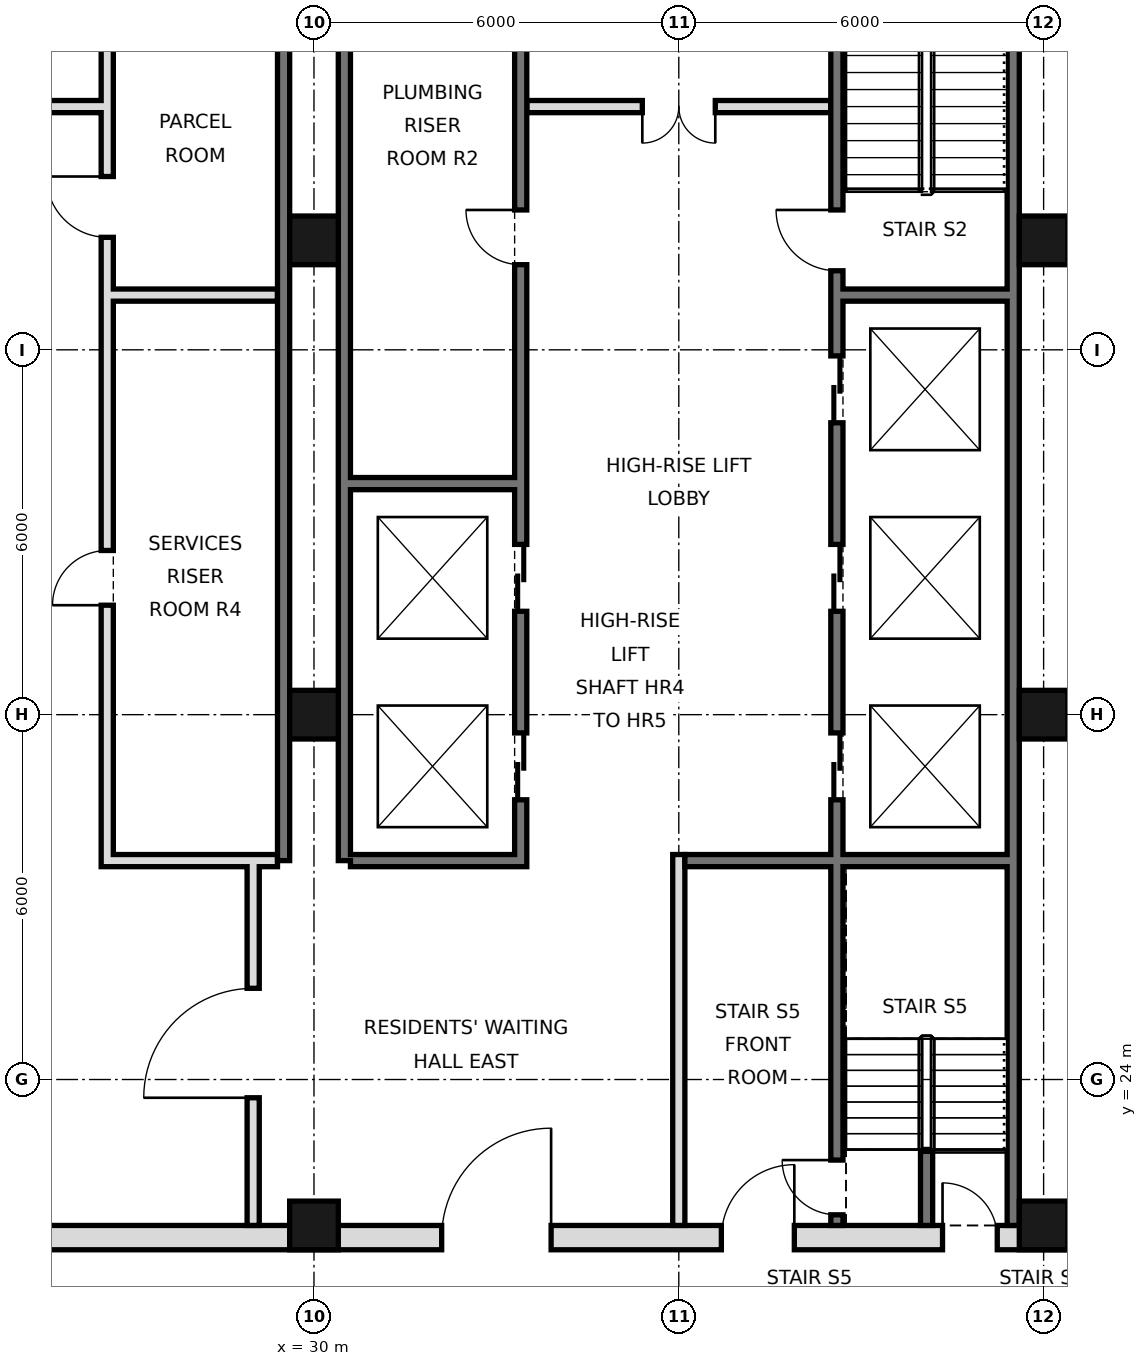
"""IFC4 building model, lengths in metres.
Left out: names, types, materials, properties, quantities, classifications, styles, units other than length and angle.
Written with IfcOpenShell. Run it as: python <this file> out.ifc"""

import sys

from ifc_helpers import new_model, si_unit, direction, frame, frame_2d, origin, origin_2d, place, context, subcontext, project, spatial, rectangle, hollow_rectangle, extrude, element, fill, save


model = new_model("IFC4")
c1 = context("Model", 3, precision=1e-05, world=origin(), true_north=direction((0.0, 1.0)))
c2 = subcontext(c1, "Body", "Model", "MODEL_VIEW")
j1 = project(units=[si_unit("LENGTHUNIT", "METRE"), si_unit("PLANEANGLEUNIT", "RADIAN")], contexts=[c1])
p1 = place(None, origin())
s1 = spatial("IfcSite", under=j1, at=p1, CompositionType="ELEMENT")
p2 = place(p1, origin())
s2 = spatial("IfcBuilding", under=s1, at=p2, CompositionType="ELEMENT")
p3 = place(p2, frame((0.0, 0.0, 234.2)))
s3 = spatial("IfcBuildingStorey", under=s2, at=p3, CompositionType="ELEMENT", Elevation=234.2)
for number, where, z_axis, x_axis in (
    (1, (30.0, 21.6, 0.0), (0.0, 0.0, 1.0), (1.0, 0.0, 0.0)),
    (2, (30.0, 30.0, 0.0), (0.0, 0.0, 1.0), (1.0, 0.0, 0.0)),
    (3, (30.0, 37.8, 0.0), (0.0, 0.0, 1.0), (1.0, 0.0, 0.0)),
    (4, (42.0, 21.6, 0.0), (0.0, 0.0, 1.0), (1.0, 0.0, 0.0)),
    (5, (42.0, 30.0, 0.0), (0.0, 0.0, 1.0), (1.0, 0.0, 0.0)),
    (6, (42.0, 37.8, 0.0), (0.0, 0.0, 1.0), (1.0, 0.0, 0.0)),
):
    element("IfcColumn", number, at=place(p3, frame(where, z_axis=z_axis, x_axis=x_axis)), inside=s3, PredefinedType="COLUMN", context=c2, shape_type="SweptSolid", body=[
        extrude(hollow_rectangle(XDim=0.8, YDim=0.8, WallThickness=0.04, at=origin_2d()), origin(), (0.0, 0.0, 1.0), 5.4),
    ])
p4 = place(p3, frame((41.5, 21.6, 0.0), z_axis=(0.0, 0.0, 1.0), x_axis=(0.0, 1.0, 0.0)))
e7 = element("IfcWall", 7, at=p4, inside=s3, PredefinedType="SOLIDWALL", context=c2, shape_type="SweptSolid", body=[
    extrude(rectangle(XDim=23.5, YDim=0.2, at=frame_2d((11.75, 0.0))), origin(), (0.0, 0.0, 1.0), 5.22),
])
for number, where, z_axis, x_axis in (
    (8, (29.5, 27.6, 0.0), (0.0, 0.0, 1.0), (0.0, 1.0, 0.0)),
    (9, (30.5, 27.6, 0.0), (0.0, 0.0, 1.0), (0.0, 1.0, 0.0)),
):
    element("IfcWall", number, at=place(p3, frame(where, z_axis=z_axis, x_axis=x_axis)), inside=s3, PredefinedType="SOLIDWALL", context=c2, shape_type="SweptSolid", body=[
        extrude(rectangle(XDim=17.5, YDim=0.2, at=frame_2d((8.75, 0.0))), origin(), (0.0, 0.0, 1.0), 5.22),
    ])
p5 = place(p3, frame((5.6, 21.4, 0.0), z_axis=(0.0, 0.0, 1.0), x_axis=(1.0, 0.0, 0.0)))
e10 = element("IfcWall", 10, at=p5, inside=s3, PredefinedType="SOLIDWALL", context=c2, shape_type="SweptSolid", body=[
    extrude(rectangle(XDim=36.8, YDim=0.4, at=frame_2d((18.4, 0.0))), origin(), (0.0, 0.0, 1.0), 5.22),
])
p6 = place(p5, frame((8.5, 0.0, 0.0)))
e11 = element("IfcOpeningElement", 11, at=p6, cuts=e10, PredefinedType="OPENING", context=c2, shape_type="SweptSolid", body=[
    extrude(rectangle(XDim=1.8, YDim=2.1, at=frame_2d((0.9, 1.05))), frame((0.0, 0.21, 0.0), z_axis=(0.0, -1.0, 0.0), x_axis=(1.0, 0.0, 0.0)), (0.0, 0.0, 1.0), 0.42),
])
p7 = place(p5, frame((17.5, 0.0, 0.0)))
e12 = element("IfcOpeningElement", 12, at=p7, cuts=e10, PredefinedType="OPENING", context=c2, shape_type="SweptSolid", body=[
    extrude(rectangle(XDim=1.8, YDim=2.1, at=frame_2d((0.9, 1.05))), frame((0.0, 0.21, 0.0), z_axis=(0.0, -1.0, 0.0), x_axis=(1.0, 0.0, 0.0)), (0.0, 0.0, 1.0), 0.42),
])
p8 = place(p5, frame((26.5, 0.0, 0.0)))
e13 = element("IfcOpeningElement", 13, at=p8, cuts=e10, PredefinedType="OPENING", context=c2, shape_type="SweptSolid", body=[
    extrude(rectangle(XDim=1.8, YDim=2.1, at=frame_2d((0.9, 1.05))), frame((0.0, 0.21, 0.0), z_axis=(0.0, -1.0, 0.0), x_axis=(1.0, 0.0, 0.0)), (0.0, 0.0, 1.0), 0.42),
])
p9 = place(p5, frame((4.5, 0.0, 0.0)))
e14 = element("IfcOpeningElement", 14, at=p9, cuts=e10, PredefinedType="OPENING", context=c2, shape_type="SweptSolid", body=[
    extrude(rectangle(XDim=1.2, YDim=2.1, at=frame_2d((0.6, 1.05))), frame((0.0, 0.21, 0.0), z_axis=(0.0, -1.0, 0.0), x_axis=(1.0, 0.0, 0.0)), (0.0, 0.0, 1.0), 0.42),
])
p10 = place(p5, frame((31.1, 0.0, 0.0)))
e15 = element("IfcOpeningElement", 15, at=p10, cuts=e10, PredefinedType="OPENING", context=c2, shape_type="SweptSolid", body=[
    extrude(rectangle(XDim=1.2, YDim=2.1, at=frame_2d((0.6, 1.05))), frame((0.0, 0.21, 0.0), z_axis=(0.0, -1.0, 0.0), x_axis=(1.0, 0.0, 0.0)), (0.0, 0.0, 1.0), 0.42),
])
p11 = place(p5, frame((1.163, 0.0, 0.0)))
e16 = element("IfcOpeningElement", 16, at=p11, cuts=e10, PredefinedType="OPENING", context=c2, shape_type="SweptSolid", body=[
    extrude(rectangle(XDim=0.9, YDim=2.1, at=frame_2d((0.45, 1.05))), frame((0.0, 0.21, 0.0), z_axis=(0.0, -1.0, 0.0), x_axis=(1.0, 0.0, 0.0)), (0.0, 0.0, 1.0), 0.42),
])
p12 = place(p5, frame((34.738, 0.0, 0.0)))
e17 = element("IfcOpeningElement", 17, at=p12, cuts=e10, PredefinedType="OPENING", context=c2, shape_type="SweptSolid", body=[
    extrude(rectangle(XDim=0.9, YDim=2.1, at=frame_2d((0.45, 1.05))), frame((0.0, 0.21, 0.0), z_axis=(0.0, -1.0, 0.0), x_axis=(1.0, 0.0, 0.0)), (0.0, 0.0, 1.0), 0.42),
])
p13 = place(p3, frame((29.0, 21.6, 0.0), z_axis=(0.0, 0.0, 1.0), x_axis=(0.0, 1.0, 0.0)))
e18 = element("IfcWall", 18, at=p13, inside=s3, PredefinedType="PARTITIONING", context=c2, shape_type="SweptSolid", body=[
    extrude(rectangle(XDim=6.0, YDim=0.2, at=frame_2d((3.0, 0.0))), origin(), (0.0, 0.0, 1.0), 5.22),
])
p14 = place(p13, frame((2.1, 0.0, 0.0)))
e19 = element("IfcOpeningElement", 19, at=p14, cuts=e18, PredefinedType="OPENING", context=c2, shape_type="SweptSolid", body=[
    extrude(rectangle(XDim=1.8, YDim=2.1, at=frame_2d((0.9, 1.05))), frame((0.0, 0.11, 0.0), z_axis=(0.0, -1.0, 0.0), x_axis=(1.0, 0.0, 0.0)), (0.0, 0.0, 1.0), 0.22),
])
p15 = place(p3, frame((26.6, 27.5, 0.0), z_axis=(0.0, 0.0, 1.0), x_axis=(0.0, 1.0, 0.0)))
e20 = element("IfcWall", 20, at=p15, inside=s3, PredefinedType="SOLIDWALL", context=c2, shape_type="SweptSolid", body=[
    extrude(rectangle(XDim=17.5, YDim=0.2, at=frame_2d((8.75, 0.0))), origin(), (0.0, 0.0, 1.0), 5.22),
])
p16 = place(p15, frame((4.3, 0.0, 0.0)))
e21 = element("IfcOpeningElement", 21, at=p16, cuts=e20, PredefinedType="OPENING", context=c2, shape_type="SweptSolid", body=[
    extrude(rectangle(XDim=0.9, YDim=2.1, at=frame_2d((0.45, 1.05))), frame((0.0, 0.11, 0.0), z_axis=(0.0, -1.0, 0.0), x_axis=(1.0, 0.0, 0.0)), (0.0, 0.0, 1.0), 0.22),
])
p17 = place(p15, frame((10.35, 0.0, 0.0)))
e22 = element("IfcOpeningElement", 22, at=p17, cuts=e20, PredefinedType="OPENING", context=c2, shape_type="SweptSolid", body=[
    extrude(rectangle(XDim=1.0, YDim=2.1, at=frame_2d((0.5, 1.05))), frame((0.0, 0.11, 0.0), z_axis=(0.0, -1.0, 0.0), x_axis=(1.0, 0.0, 0.0)), (0.0, 0.0, 1.0), 0.22),
])
p18 = place(p15, frame((15.475, 0.0, 0.0)))
e23 = element("IfcOpeningElement", 23, at=p18, cuts=e20, PredefinedType="OPENING", context=c2, shape_type="SweptSolid", body=[
    extrude(rectangle(XDim=1.0, YDim=2.1, at=frame_2d((0.5, 1.05))), frame((0.0, 0.11, 0.0), z_axis=(0.0, -1.0, 0.0), x_axis=(1.0, 0.0, 0.0)), (0.0, 0.0, 1.0), 0.22),
])
p19 = place(p3, frame((33.4, 27.5, 0.0), z_axis=(0.0, 0.0, 1.0), x_axis=(0.0, 1.0, 0.0)))
e24 = element("IfcWall", 24, at=p19, inside=s3, PredefinedType="SOLIDWALL", context=c2, shape_type="SweptSolid", body=[
    extrude(rectangle(XDim=17.5, YDim=0.2, at=frame_2d((8.75, 0.0))), origin(), (0.0, 0.0, 1.0), 5.22),
])
p20 = place(p19, frame((1.1, 0.0, 0.0)))
e25 = element("IfcOpeningElement", 25, at=p20, cuts=e24, PredefinedType="OPENING", context=c2, shape_type="SweptSolid", body=[
    extrude(rectangle(XDim=1.1, YDim=2.1, at=frame_2d((0.55, 1.05))), frame((0.0, 0.11, 0.0), z_axis=(0.0, -1.0, 0.0), x_axis=(1.0, 0.0, 0.0)), (0.0, 0.0, 1.0), 0.22),
])
p21 = place(p19, frame((4.2, 0.0, 0.0)))
e26 = element("IfcOpeningElement", 26, at=p21, cuts=e24, PredefinedType="OPENING", context=c2, shape_type="SweptSolid", body=[
    extrude(rectangle(XDim=1.1, YDim=2.1, at=frame_2d((0.55, 1.05))), frame((0.0, 0.11, 0.0), z_axis=(0.0, -1.0, 0.0), x_axis=(1.0, 0.0, 0.0)), (0.0, 0.0, 1.0), 0.22),
])
p22 = place(p19, frame((15.4, 0.0, 0.0)))
e27 = element("IfcOpeningElement", 27, at=p22, cuts=e24, PredefinedType="OPENING", context=c2, shape_type="SweptSolid", body=[
    extrude(rectangle(XDim=1.1, YDim=2.1, at=frame_2d((0.55, 1.05))), frame((0.0, 0.11, 0.0), z_axis=(0.0, -1.0, 0.0), x_axis=(1.0, 0.0, 0.0)), (0.0, 0.0, 1.0), 0.22),
])
p23 = place(p19, frame((9.9, 0.0, 0.0)))
e28 = element("IfcOpeningElement", 28, at=p23, cuts=e24, PredefinedType="OPENING", context=c2, shape_type="SweptSolid", body=[
    extrude(rectangle(XDim=0.9, YDim=2.1, at=frame_2d((0.45, 1.05))), frame((0.0, 0.11, 0.0), z_axis=(0.0, -1.0, 0.0), x_axis=(1.0, 0.0, 0.0)), (0.0, 0.0, 1.0), 0.22),
])
p24 = place(p3, frame((36.0, 21.6, 0.0), z_axis=(0.0, 0.0, 1.0), x_axis=(0.0, 1.0, 0.0)))
e29 = element("IfcWall", 29, at=p24, inside=s3, PredefinedType="PARTITIONING", context=c2, shape_type="SweptSolid", body=[
    extrude(rectangle(XDim=6.1, YDim=0.2, at=frame_2d((3.05, 0.0))), origin(), (0.0, 0.0, 1.0), 5.22),
])
p25 = place(p3, frame((38.6, 21.6, 0.0), z_axis=(0.0, 0.0, 1.0), x_axis=(0.0, 1.0, 0.0)))
e30 = element("IfcWall", 30, at=p25, inside=s3, PredefinedType="SOLIDWALL", context=c2, shape_type="SweptSolid", body=[
    extrude(rectangle(XDim=23.4, YDim=0.2, at=frame_2d((11.7, 0.0))), origin(), (0.0, 0.0, 1.0), 5.22),
])
p26 = place(p25, frame((7.0, 0.0, 0.0)))
e31 = element("IfcOpeningElement", 31, at=p26, cuts=e30, PredefinedType="OPENING", context=c2, shape_type="SweptSolid", body=[
    extrude(rectangle(XDim=1.1, YDim=2.1, at=frame_2d((0.55, 1.05))), frame((0.0, 0.11, 0.0), z_axis=(0.0, -1.0, 0.0), x_axis=(1.0, 0.0, 0.0)), (0.0, 0.0, 1.0), 0.22),
])
p27 = place(p25, frame((10.1, 0.0, 0.0)))
e32 = element("IfcOpeningElement", 32, at=p27, cuts=e30, PredefinedType="OPENING", context=c2, shape_type="SweptSolid", body=[
    extrude(rectangle(XDim=1.1, YDim=2.1, at=frame_2d((0.55, 1.05))), frame((0.0, 0.11, 0.0), z_axis=(0.0, -1.0, 0.0), x_axis=(1.0, 0.0, 0.0)), (0.0, 0.0, 1.0), 0.22),
])
p28 = place(p25, frame((13.2, 0.0, 0.0)))
e33 = element("IfcOpeningElement", 33, at=p28, cuts=e30, PredefinedType="OPENING", context=c2, shape_type="SweptSolid", body=[
    extrude(rectangle(XDim=1.1, YDim=2.1, at=frame_2d((0.55, 1.05))), frame((0.0, 0.11, 0.0), z_axis=(0.0, -1.0, 0.0), x_axis=(1.0, 0.0, 0.0)), (0.0, 0.0, 1.0), 0.22),
])
p29 = place(p25, frame((22.1, 0.0, 0.0)))
e34 = element("IfcOpeningElement", 34, at=p29, cuts=e30, PredefinedType="OPENING", context=c2, shape_type="SweptSolid", body=[
    extrude(rectangle(XDim=1.0, YDim=2.1, at=frame_2d((0.5, 1.05))), frame((0.0, 0.11, 0.0), z_axis=(0.0, -1.0, 0.0), x_axis=(1.0, 0.0, 0.0)), (0.0, 0.0, 1.0), 0.22),
])
p30 = place(p25, frame((15.7, 0.0, 0.0)))
e35 = element("IfcOpeningElement", 35, at=p30, cuts=e30, PredefinedType="OPENING", context=c2, shape_type="SweptSolid", body=[
    extrude(rectangle(XDim=1.0, YDim=2.1, at=frame_2d((0.5, 1.05))), frame((0.0, 0.11, 0.0), z_axis=(0.0, -1.0, 0.0), x_axis=(1.0, 0.0, 0.0)), (0.0, 0.0, 1.0), 0.22),
])
p31 = place(p25, frame((0.175, 0.0, 0.0)))
e36 = element("IfcOpeningElement", 36, at=p31, cuts=e30, PredefinedType="OPENING", context=c2, shape_type="SweptSolid", body=[
    extrude(rectangle(XDim=0.9, YDim=2.1, at=frame_2d((0.45, 1.05))), frame((0.0, 0.11, 0.0), z_axis=(0.0, -1.0, 0.0), x_axis=(1.0, 0.0, 0.0)), (0.0, 0.0, 1.0), 0.22),
])
p32 = place(p3, frame((40.075, 21.6, 0.0), z_axis=(0.0, 0.0, 1.0), x_axis=(0.0, 1.0, 0.0)))
e37 = element("IfcWall", 37, at=p32, inside=s3, PredefinedType="SOLIDWALL", context=c2, shape_type="SweptSolid", body=[
    extrude(rectangle(XDim=1.25, YDim=0.2, at=frame_2d((0.625, 0.0))), origin(), (0.0, 0.0, 1.0), 5.22),
])
for number, where, z_axis, x_axis in (
    (38, (26.7, 27.6, 0.0), (0.0, 0.0, 1.0), (1.0, 0.0, 0.0)),
    (39, (30.6, 27.6, 0.0), (0.0, 0.0, 1.0), (1.0, 0.0, 0.0)),
):
    element("IfcWall", number, at=place(p3, frame(where, z_axis=z_axis, x_axis=x_axis)), inside=s3, PredefinedType="SOLIDWALL", context=c2, shape_type="SweptSolid", body=[
        extrude(rectangle(XDim=2.7, YDim=0.2, at=frame_2d((1.35, 0.0))), origin(), (0.0, 0.0, 1.0), 5.22),
    ])
p33 = place(p3, frame((36.1, 27.6, 0.0), z_axis=(0.0, 0.0, 1.0), x_axis=(1.0, 0.0, 0.0)))
e40 = element("IfcWall", 40, at=p33, inside=s3, PredefinedType="SOLIDWALL", context=c2, shape_type="SweptSolid", body=[
    extrude(rectangle(XDim=5.3, YDim=0.2, at=frame_2d((2.65, 0.0))), origin(), (0.0, 0.0, 1.0), 5.22),
])
for number, where, z_axis, x_axis in (
    (41, (30.6, 33.8, 0.0), (0.0, 0.0, 1.0), (1.0, 0.0, 0.0)),
    (42, (26.7, 36.9, 0.0), (0.0, 0.0, 1.0), (1.0, 0.0, 0.0)),
    (43, (38.7, 36.9, 0.0), (0.0, 0.0, 1.0), (1.0, 0.0, 0.0)),
):
    element("IfcWall", number, at=place(p3, frame(where, z_axis=z_axis, x_axis=x_axis)), inside=s3, PredefinedType="SOLIDWALL", context=c2, shape_type="SweptSolid", body=[
        extrude(rectangle(XDim=2.7, YDim=0.2, at=frame_2d((1.35, 0.0))), origin(), (0.0, 0.0, 1.0), 5.22),
    ])
p34 = place(p3, frame((21.5, 40.0, 0.0), z_axis=(0.0, 0.0, 1.0), x_axis=(1.0, 0.0, 0.0)))
e44 = element("IfcWall", 44, at=p34, inside=s3, PredefinedType="PARTITIONING", context=c2, shape_type="SweptSolid", body=[
    extrude(rectangle(XDim=5.0, YDim=0.2, at=frame_2d((2.5, 0.0))), origin(), (0.0, 0.0, 1.0), 5.22),
])
p35 = place(p34, frame((1.9, 0.0, 0.0)))
e45 = element("IfcOpeningElement", 45, at=p35, cuts=e44, PredefinedType="OPENING", context=c2, shape_type="SweptSolid", body=[
    extrude(rectangle(XDim=1.2, YDim=2.1, at=frame_2d((0.6, 1.05))), frame((0.0, 0.11, 0.0), z_axis=(0.0, -1.0, 0.0), x_axis=(1.0, 0.0, 0.0)), (0.0, 0.0, 1.0), 0.22),
])
p36 = place(p3, frame((33.5, 40.0, 0.0), z_axis=(0.0, 0.0, 1.0), x_axis=(1.0, 0.0, 0.0)))
e46 = element("IfcWall", 46, at=p36, inside=s3, PredefinedType="PARTITIONING", context=c2, shape_type="SweptSolid", body=[
    extrude(rectangle(XDim=5.0, YDim=0.2, at=frame_2d((2.5, 0.0))), origin(), (0.0, 0.0, 1.0), 5.22),
])
p37 = place(p36, frame((1.9, 0.0, 0.0)))
e47 = element("IfcOpeningElement", 47, at=p37, cuts=e46, PredefinedType="OPENING", context=c2, shape_type="SweptSolid", body=[
    extrude(rectangle(XDim=1.2, YDim=2.1, at=frame_2d((0.6, 1.05))), frame((0.0, 0.11, 0.0), z_axis=(0.0, -1.0, 0.0), x_axis=(1.0, 0.0, 0.0)), (0.0, 0.0, 1.0), 0.22),
])
p38 = place(p14, origin())
e48 = element("IfcDoor", 48, at=p38, inside=s3, OperationType="SINGLE_SWING_LEFT", PredefinedType="DOOR", context=c2, shape_type="SweptSolid", body=[
    extrude(rectangle(XDim=1.8, YDim=2.1, at=frame_2d((0.9, 1.05))), frame((0.0, 0.025, 0.0), z_axis=(0.0, -1.0, 0.0), x_axis=(1.0, 0.0, 0.0)), (0.0, 0.0, 1.0), 0.05),
])
fill(e19, e48)
p39 = place(p8, frame((1.8, 0.0, 0.0), z_axis=(0.0, 0.0, 1.0), x_axis=(-1.0, 0.0, 0.0)))
e49 = element("IfcDoor", 49, at=p39, inside=s3, OperationType="SINGLE_SWING_LEFT", PredefinedType="DOOR", context=c2, shape_type="SweptSolid", body=[
    extrude(rectangle(XDim=1.8, YDim=2.1, at=frame_2d((0.9, 1.05))), frame((0.0, 0.025, 0.0), z_axis=(0.0, -1.0, 0.0), x_axis=(1.0, 0.0, 0.0)), (0.0, 0.0, 1.0), 0.05),
])
fill(e13, e49)
p40 = place(p10, frame((1.2, 0.0, 0.0), z_axis=(0.0, 0.0, 1.0), x_axis=(-1.0, 0.0, 0.0)))
e50 = element("IfcDoor", 50, at=p40, inside=s3, OperationType="SINGLE_SWING_LEFT", PredefinedType="DOOR", context=c2, shape_type="SweptSolid", body=[
    extrude(rectangle(XDim=1.2, YDim=2.1, at=frame_2d((0.6, 1.05))), frame((0.0, 0.025, 0.0), z_axis=(0.0, -1.0, 0.0), x_axis=(1.0, 0.0, 0.0)), (0.0, 0.0, 1.0), 0.05),
])
fill(e15, e50)
p41 = place(p37, frame((1.2, 0.0, 0.0), z_axis=(0.0, 0.0, 1.0), x_axis=(-1.0, 0.0, 0.0)))
e51 = element("IfcDoor", 51, at=p41, inside=s3, OperationType="DOUBLE_DOOR_SINGLE_SWING", PredefinedType="DOOR", context=c2, shape_type="SweptSolid", body=[
    extrude(rectangle(XDim=1.2, YDim=2.1, at=frame_2d((0.6, 1.05))), frame((0.0, 0.025, 0.0), z_axis=(0.0, -1.0, 0.0), x_axis=(1.0, 0.0, 0.0)), (0.0, 0.0, 1.0), 0.05),
])
fill(e47, e51)
p42 = place(p26, origin())
e52 = element("IfcDoor", 52, at=p42, inside=s3, OperationType="DOUBLE_DOOR_SLIDING", PredefinedType="DOOR", context=c2, shape_type="SweptSolid", body=[
    extrude(rectangle(XDim=1.1, YDim=2.1, at=frame_2d((0.55, 1.05))), frame((0.0, 0.025, 0.0), z_axis=(0.0, -1.0, 0.0), x_axis=(1.0, 0.0, 0.0)), (0.0, 0.0, 1.0), 0.05),
])
fill(e31, e52)
p43 = place(p27, origin())
e53 = element("IfcDoor", 53, at=p43, inside=s3, OperationType="DOUBLE_DOOR_SLIDING", PredefinedType="DOOR", context=c2, shape_type="SweptSolid", body=[
    extrude(rectangle(XDim=1.1, YDim=2.1, at=frame_2d((0.55, 1.05))), frame((0.0, 0.025, 0.0), z_axis=(0.0, -1.0, 0.0), x_axis=(1.0, 0.0, 0.0)), (0.0, 0.0, 1.0), 0.05),
])
fill(e32, e53)
p44 = place(p28, origin())
e54 = element("IfcDoor", 54, at=p44, inside=s3, OperationType="DOUBLE_DOOR_SLIDING", PredefinedType="DOOR", context=c2, shape_type="SweptSolid", body=[
    extrude(rectangle(XDim=1.1, YDim=2.1, at=frame_2d((0.55, 1.05))), frame((0.0, 0.025, 0.0), z_axis=(0.0, -1.0, 0.0), x_axis=(1.0, 0.0, 0.0)), (0.0, 0.0, 1.0), 0.05),
])
fill(e33, e54)
p45 = place(p20, origin())
e55 = element("IfcDoor", 55, at=p45, inside=s3, OperationType="DOUBLE_DOOR_SLIDING", PredefinedType="DOOR", context=c2, shape_type="SweptSolid", body=[
    extrude(rectangle(XDim=1.1, YDim=2.1, at=frame_2d((0.55, 1.05))), frame((0.0, 0.025, 0.0), z_axis=(0.0, -1.0, 0.0), x_axis=(1.0, 0.0, 0.0)), (0.0, 0.0, 1.0), 0.05),
])
fill(e25, e55)
p46 = place(p21, origin())
e56 = element("IfcDoor", 56, at=p46, inside=s3, OperationType="DOUBLE_DOOR_SLIDING", PredefinedType="DOOR", context=c2, shape_type="SweptSolid", body=[
    extrude(rectangle(XDim=1.1, YDim=2.1, at=frame_2d((0.55, 1.05))), frame((0.0, 0.025, 0.0), z_axis=(0.0, -1.0, 0.0), x_axis=(1.0, 0.0, 0.0)), (0.0, 0.0, 1.0), 0.05),
])
fill(e26, e56)
p47 = place(p30, frame((1.0, 0.0, 0.0), z_axis=(0.0, 0.0, 1.0), x_axis=(-1.0, 0.0, 0.0)))
e57 = element("IfcDoor", 57, at=p47, inside=s3, OperationType="SINGLE_SWING_LEFT", PredefinedType="DOOR", context=c2, shape_type="SweptSolid", body=[
    extrude(rectangle(XDim=1.0, YDim=2.1, at=frame_2d((0.5, 1.05))), frame((0.0, 0.025, 0.0), z_axis=(0.0, -1.0, 0.0), x_axis=(1.0, 0.0, 0.0)), (0.0, 0.0, 1.0), 0.05),
])
fill(e35, e57)
p48 = place(p31, frame((0.9, 0.0, 0.0), z_axis=(0.0, 0.0, 1.0), x_axis=(-1.0, 0.0, 0.0)))
e58 = element("IfcDoor", 58, at=p48, inside=s3, OperationType="SINGLE_SWING_LEFT", PredefinedType="DOOR", context=c2, shape_type="SweptSolid", body=[
    extrude(rectangle(XDim=0.9, YDim=2.1, at=frame_2d((0.45, 1.05))), frame((0.0, 0.025, 0.0), z_axis=(0.0, -1.0, 0.0), x_axis=(1.0, 0.0, 0.0)), (0.0, 0.0, 1.0), 0.05),
])
fill(e36, e58)
p49 = place(p12, origin())
e59 = element("IfcDoor", 59, at=p49, inside=s3, OperationType="SINGLE_SWING_LEFT", PredefinedType="DOOR", context=c2, shape_type="SweptSolid", body=[
    extrude(rectangle(XDim=0.9, YDim=2.1, at=frame_2d((0.45, 1.05))), frame((0.0, 0.025, 0.0), z_axis=(0.0, -1.0, 0.0), x_axis=(1.0, 0.0, 0.0)), (0.0, 0.0, 1.0), 0.05),
])
fill(e17, e59)
p50 = place(p23, frame((0.9, 0.0, 0.0), z_axis=(0.0, 0.0, 1.0), x_axis=(-1.0, 0.0, 0.0)))
e60 = element("IfcDoor", 60, at=p50, inside=s3, OperationType="SINGLE_SWING_LEFT", PredefinedType="DOOR", context=c2, shape_type="SweptSolid", body=[
    extrude(rectangle(XDim=0.9, YDim=2.1, at=frame_2d((0.45, 1.05))), frame((0.0, 0.025, 0.0), z_axis=(0.0, -1.0, 0.0), x_axis=(1.0, 0.0, 0.0)), (0.0, 0.0, 1.0), 0.05),
])
fill(e28, e60)
p51 = place(p16, origin())
e61 = element("IfcDoor", 61, at=p51, inside=s3, OperationType="SINGLE_SWING_LEFT", PredefinedType="DOOR", context=c2, shape_type="SweptSolid", body=[
    extrude(rectangle(XDim=0.9, YDim=2.1, at=frame_2d((0.45, 1.05))), frame((0.0, 0.025, 0.0), z_axis=(0.0, -1.0, 0.0), x_axis=(1.0, 0.0, 0.0)), (0.0, 0.0, 1.0), 0.05),
])
fill(e21, e61)
p52 = place(p17, frame((1.0, 0.0, 0.0), z_axis=(0.0, 0.0, 1.0), x_axis=(-1.0, 0.0, 0.0)))
e62 = element("IfcDoor", 62, at=p52, inside=s3, OperationType="SINGLE_SWING_LEFT", PredefinedType="DOOR", context=c2, shape_type="SweptSolid", body=[
    extrude(rectangle(XDim=1.0, YDim=2.1, at=frame_2d((0.5, 1.05))), frame((0.0, 0.025, 0.0), z_axis=(0.0, -1.0, 0.0), x_axis=(1.0, 0.0, 0.0)), (0.0, 0.0, 1.0), 0.05),
])
fill(e22, e62)
save(model, sys.argv[1])
